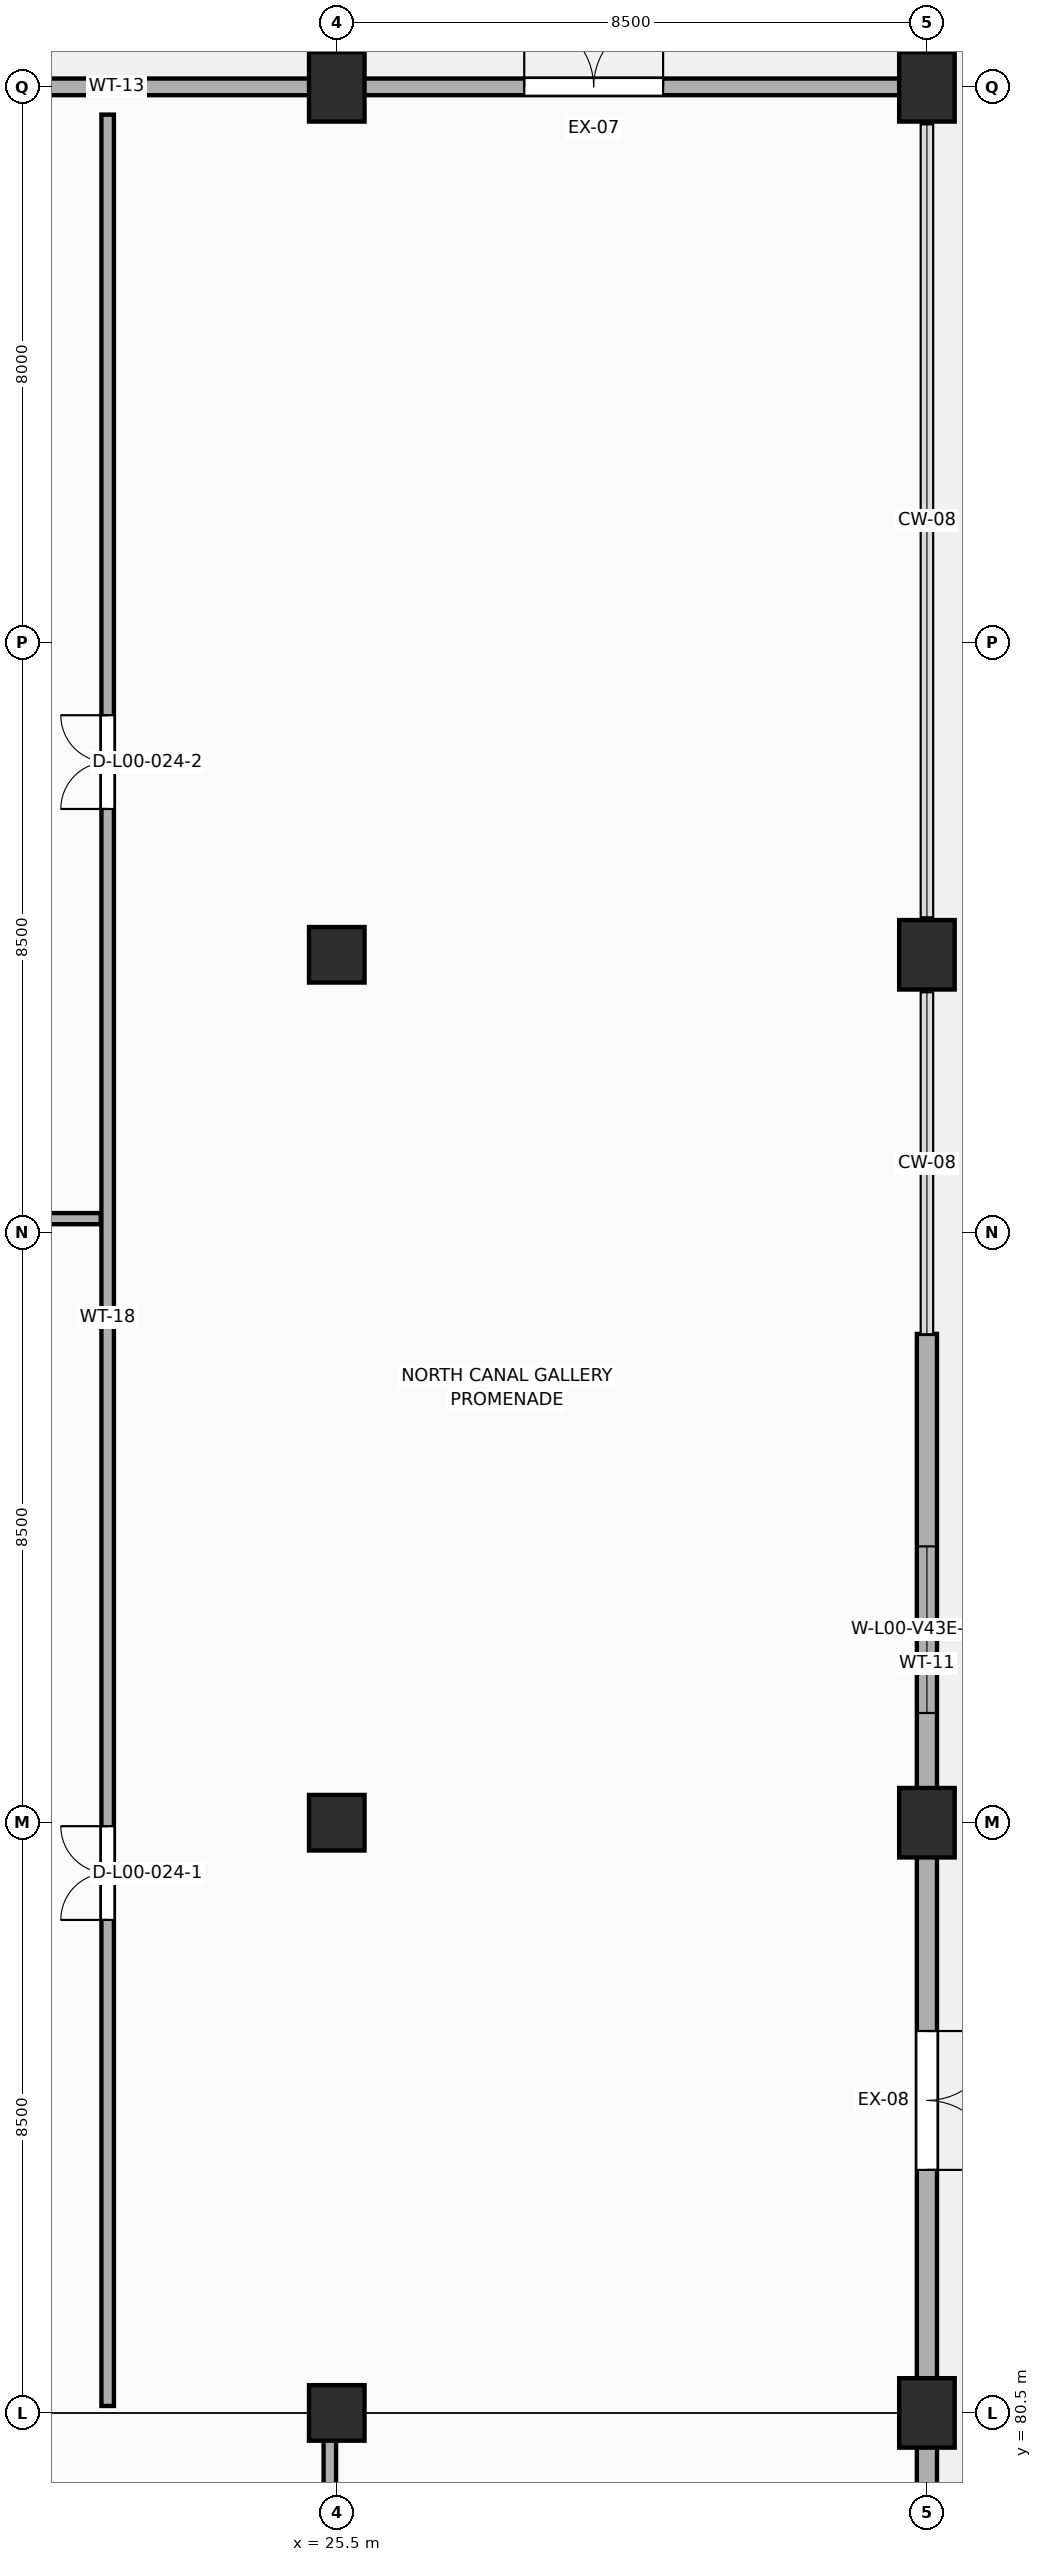
"""IFC4 building model, lengths in metres.
Left out: names, types, materials, properties, quantities, classifications, styles, units other than length and angle.
Written with IfcOpenShell. Run it as: python <this file> out.ifc"""

import sys

from ifc_helpers import new_model, si_unit, direction, frame, frame_2d, origin, origin_2d, place, context, subcontext, project, spatial, rectangle, extrude, element, fill, save


model = new_model("IFC4")
c1 = context("Model", 3, precision=1e-05, world=origin(), true_north=direction((0.0, 1.0)))
c2 = subcontext(c1, "Body", "Model", "MODEL_VIEW")
j1 = project(units=[si_unit("LENGTHUNIT", "METRE"), si_unit("PLANEANGLEUNIT", "RADIAN")], contexts=[c1])
p1 = place(None, origin())
s1 = spatial("IfcSite", under=j1, at=p1, CompositionType="ELEMENT")
p2 = place(p1, origin())
s2 = spatial("IfcBuilding", under=s1, at=p2, CompositionType="ELEMENT")
p3 = place(p2, origin())
s3 = spatial("IfcBuildingStorey", under=s2, at=p3, CompositionType="ELEMENT", Elevation=0.0)
for number, where, z_axis, x_axis in (
    (1, (25.5, 80.5, 0.0), (0.0, 0.0, 1.0), (1.0, 0.0, 0.0)),
    (2, (25.5, 89.0, 0.0), (0.0, 0.0, 1.0), (1.0, 0.0, 0.0)),
    (3, (25.5, 101.5, 0.0), (0.0, 0.0, 1.0), (1.0, 0.0, 0.0)),
):
    element("IfcColumn", number, at=place(p3, frame(where, z_axis=z_axis, x_axis=x_axis)), inside=s3, PredefinedType="COLUMN", context=c2, shape_type="SweptSolid", body=[
        extrude(rectangle(XDim=0.8, YDim=0.8, at=origin_2d()), origin(), (0.0, 0.0, 1.0), 5.14),
    ])
for number, where, z_axis, x_axis in (
    (4, (25.5, 114.0, 0.0), (0.0, 0.0, 1.0), (1.0, 0.0, 0.0)),
    (5, (34.0, 80.5, 0.0), (0.0, 0.0, 1.0), (1.0, 0.0, 0.0)),
    (6, (34.0, 89.0, 0.0), (0.0, 0.0, 1.0), (1.0, 0.0, 0.0)),
    (7, (34.0, 101.5, 0.0), (0.0, 0.0, 1.0), (1.0, 0.0, 0.0)),
    (8, (34.0, 114.0, 0.0), (0.0, 0.0, 1.0), (1.0, 0.0, 0.0)),
):
    element("IfcColumn", number, at=place(p3, frame(where, z_axis=z_axis, x_axis=x_axis)), inside=s3, PredefinedType="COLUMN", context=c2, shape_type="SweptSolid", body=[
        extrude(rectangle(XDim=0.8, YDim=1.0, at=origin_2d()), origin(), (0.0, 0.0, 1.0), 5.14),
    ])
p4 = place(p3, frame((17.0, 114.0, 0.0), z_axis=(0.0, 0.0, 1.0), x_axis=(1.0, 0.0, 0.0)))
e9 = element("IfcWall", 9, at=p4, inside=s3, PredefinedType="STANDARD", context=c2, shape_type="SweptSolid", body=[
    extrude(rectangle(XDim=17.0, YDim=0.24, at=frame_2d((8.5, 0.0))), origin(), (0.0, 0.0, 1.0), 4.28),
])
p5 = place(p4, frame((11.2, 0.0, 0.0)))
e10 = element("IfcOpeningElement", 10, at=p5, cuts=e9, PredefinedType="OPENING", context=c2, shape_type="SweptSolid", body=[
    extrude(rectangle(XDim=2.0, YDim=2.4, at=frame_2d((1.0, 1.2))), frame((0.0, 0.132, 0.0), z_axis=(0.0, -1.0, 0.0), x_axis=(1.0, 0.0, 0.0)), (0.0, 0.0, 1.0), 0.264),
])
p6 = place(p3, frame((34.0, 61.96, 0.0), z_axis=(0.0, 0.0, 1.0), x_axis=(0.0, 1.0, 0.0)))
e11 = element("IfcWall", 11, at=p6, inside=s3, PredefinedType="STANDARD", context=c2, shape_type="SweptSolid", body=[
    extrude(rectangle(XDim=34.08, YDim=0.29, at=frame_2d((17.04, 0.0))), origin(), (0.0, 0.0, 1.0), 4.28),
])
p7 = place(p6, frame((22.04, 0.0, 0.0)))
e12 = element("IfcOpeningElement", 12, at=p7, cuts=e11, PredefinedType="OPENING", context=c2, shape_type="SweptSolid", body=[
    extrude(rectangle(XDim=2.0, YDim=2.4, at=frame_2d((1.0, 1.2))), frame((0.0, 0.157, 0.0), z_axis=(0.0, -1.0, 0.0), x_axis=(1.0, 0.0, 0.0)), (0.0, 0.0, 1.0), 0.314),
])
p8 = place(p6, frame((11.58, 0.0, 1.0)))
e13 = element("IfcOpeningElement", 13, at=p8, cuts=e11, PredefinedType="OPENING", context=c2, shape_type="SweptSolid", body=[
    extrude(rectangle(XDim=2.4, YDim=1.8, at=frame_2d((1.2, 0.9))), frame((0.0, 0.157, 0.0), z_axis=(0.0, -1.0, 0.0), x_axis=(1.0, 0.0, 0.0)), (0.0, 0.0, 1.0), 0.314),
])
p9 = place(p6, frame((28.62, 0.0, 1.0)))
e14 = element("IfcOpeningElement", 14, at=p9, cuts=e11, PredefinedType="OPENING", context=c2, shape_type="SweptSolid", body=[
    extrude(rectangle(XDim=2.4, YDim=1.8, at=frame_2d((1.2, 0.9))), frame((0.0, 0.157, 0.0), z_axis=(0.0, -1.0, 0.0), x_axis=(1.0, 0.0, 0.0)), (0.0, 0.0, 1.0), 0.314),
])
p10 = place(p3, frame((25.4, 45.0, 0.0), z_axis=(0.0, 0.0, 1.0), x_axis=(0.0, 1.0, 0.0)))
e15 = element("IfcWall", 15, at=p10, inside=s3, PredefinedType="PARTITIONING", context=c2, shape_type="SweptSolid", body=[
    extrude(rectangle(XDim=35.2, YDim=0.18, at=frame_2d((17.6, 0.0))), origin(), (0.0, 0.0, 1.0), 4.03),
])
p11 = place(p10, frame((8.0, 0.0, 0.0)))
e16 = element("IfcOpeningElement", 16, at=p11, cuts=e15, PredefinedType="OPENING", context=c2, shape_type="SweptSolid", body=[
    extrude(rectangle(XDim=1.35, YDim=2.25, at=frame_2d((0.675, 1.125))), frame((0.0, 0.102, 0.0), z_axis=(0.0, -1.0, 0.0), x_axis=(1.0, 0.0, 0.0)), (0.0, 0.0, 1.0), 0.204),
])
p12 = place(p10, frame((21.5, 0.0, 0.0)))
e17 = element("IfcOpeningElement", 17, at=p12, cuts=e15, PredefinedType="OPENING", context=c2, shape_type="SweptSolid", body=[
    extrude(rectangle(XDim=0.9, YDim=2.15, at=frame_2d((0.45, 1.075))), frame((0.0, 0.102, 0.0), z_axis=(0.0, -1.0, 0.0), x_axis=(1.0, 0.0, 0.0)), (0.0, 0.0, 1.0), 0.204),
])
p13 = place(p10, frame((28.5, 0.0, 0.0)))
e18 = element("IfcOpeningElement", 18, at=p13, cuts=e15, PredefinedType="OPENING", context=c2, shape_type="SweptSolid", body=[
    extrude(rectangle(XDim=0.9, YDim=2.15, at=frame_2d((0.45, 1.075))), frame((0.0, 0.102, 0.0), z_axis=(0.0, -1.0, 0.0), x_axis=(1.0, 0.0, 0.0)), (0.0, 0.0, 1.0), 0.204),
])
p14 = place(p10, frame((33.2, 0.0, 0.0)))
e19 = element("IfcOpeningElement", 19, at=p14, cuts=e15, PredefinedType="OPENING", context=c2, shape_type="SweptSolid", body=[
    extrude(rectangle(XDim=0.95, YDim=2.15, at=frame_2d((0.475, 1.075))), frame((0.0, 0.102, 0.0), z_axis=(0.0, -1.0, 0.0), x_axis=(1.0, 0.0, 0.0)), (0.0, 0.0, 1.0), 0.204),
])
p15 = place(p3, frame((22.2, 80.6, 0.0), z_axis=(0.0, 0.0, 1.0), x_axis=(0.0, 1.0, 0.0)))
e20 = element("IfcWall", 20, at=p15, inside=s3, PredefinedType="PARTITIONING", context=c2, shape_type="SweptSolid", body=[
    extrude(rectangle(XDim=33.0, YDim=0.18, at=frame_2d((16.5, 0.0))), origin(), (0.0, 0.0, 1.0), 4.18),
])
p16 = place(p15, frame((7.0, 0.0, 0.0)))
e21 = element("IfcOpeningElement", 21, at=p16, cuts=e20, PredefinedType="OPENING", context=c2, shape_type="SweptSolid", body=[
    extrude(rectangle(XDim=1.35, YDim=2.25, at=frame_2d((0.675, 1.125))), frame((0.0, 0.102, 0.0), z_axis=(0.0, -1.0, 0.0), x_axis=(1.0, 0.0, 0.0)), (0.0, 0.0, 1.0), 0.204),
])
p17 = place(p15, frame((23.0, 0.0, 0.0)))
e22 = element("IfcOpeningElement", 22, at=p17, cuts=e20, PredefinedType="OPENING", context=c2, shape_type="SweptSolid", body=[
    extrude(rectangle(XDim=1.35, YDim=2.25, at=frame_2d((0.675, 1.125))), frame((0.0, 0.102, 0.0), z_axis=(0.0, -1.0, 0.0), x_axis=(1.0, 0.0, 0.0)), (0.0, 0.0, 1.0), 0.204),
])
p18 = place(p3, frame((0.4, 97.7, 0.0), z_axis=(0.0, 0.0, 1.0), x_axis=(1.0, 0.0, 0.0)))
e23 = element("IfcWall", 23, at=p18, inside=s3, PredefinedType="PARTITIONING", context=c2, shape_type="SweptSolid", body=[
    extrude(rectangle(XDim=21.7, YDim=0.16, at=frame_2d((10.85, 0.0))), origin(), (0.0, 0.0, 1.0), 4.18),
])
p19 = place(p5, origin())
e24 = element("IfcDoor", 24, at=p19, inside=s3, OperationType="DOUBLE_DOOR_SINGLE_SWING", PredefinedType="DOOR", context=c2, shape_type="SweptSolid", body=[
    extrude(rectangle(XDim=2.0, YDim=2.4, at=frame_2d((1.0, 1.2))), frame((0.0, 0.025, 0.0), z_axis=(0.0, -1.0, 0.0), x_axis=(1.0, 0.0, 0.0)), (0.0, 0.0, 1.0), 0.05),
])
fill(e10, e24)
p20 = place(p7, frame((2.0, 0.0, 0.0), z_axis=(0.0, 0.0, 1.0), x_axis=(-1.0, 0.0, 0.0)))
e25 = element("IfcDoor", 25, at=p20, inside=s3, OperationType="DOUBLE_DOOR_SINGLE_SWING", PredefinedType="DOOR", context=c2, shape_type="SweptSolid", body=[
    extrude(rectangle(XDim=2.0, YDim=2.4, at=frame_2d((1.0, 1.2))), frame((0.0, 0.025, 0.0), z_axis=(0.0, -1.0, 0.0), x_axis=(1.0, 0.0, 0.0)), (0.0, 0.0, 1.0), 0.05),
])
fill(e12, e25)
p21 = place(p9, origin())
e26 = element("IfcWindow", 26, at=p21, inside=s3, PartitioningType="SINGLE_PANEL", PredefinedType="WINDOW", context=c2, shape_type="SweptSolid", body=[
    extrude(rectangle(XDim=2.4, YDim=1.8, at=frame_2d((1.2, 0.9))), frame((0.0, 0.03, 0.0), z_axis=(0.0, -1.0, 0.0), x_axis=(1.0, 0.0, 0.0)), (0.0, 0.0, 1.0), 0.06),
])
fill(e14, e26)
p22 = place(p16, origin())
e27 = element("IfcDoor", 27, at=p22, inside=s3, OperationType="DOUBLE_DOOR_SINGLE_SWING", PredefinedType="DOOR", context=c2, shape_type="SweptSolid", body=[
    extrude(rectangle(XDim=1.35, YDim=2.25, at=frame_2d((0.675, 1.125))), frame((0.0, 0.025, 0.0), z_axis=(0.0, -1.0, 0.0), x_axis=(1.0, 0.0, 0.0)), (0.0, 0.0, 1.0), 0.05),
])
fill(e21, e27)
p23 = place(p17, origin())
e28 = element("IfcDoor", 28, at=p23, inside=s3, OperationType="DOUBLE_DOOR_SINGLE_SWING", PredefinedType="DOOR", context=c2, shape_type="SweptSolid", body=[
    extrude(rectangle(XDim=1.35, YDim=2.25, at=frame_2d((0.675, 1.125))), frame((0.0, 0.025, 0.0), z_axis=(0.0, -1.0, 0.0), x_axis=(1.0, 0.0, 0.0)), (0.0, 0.0, 1.0), 0.05),
])
fill(e22, e28)
save(model, sys.argv[1])
